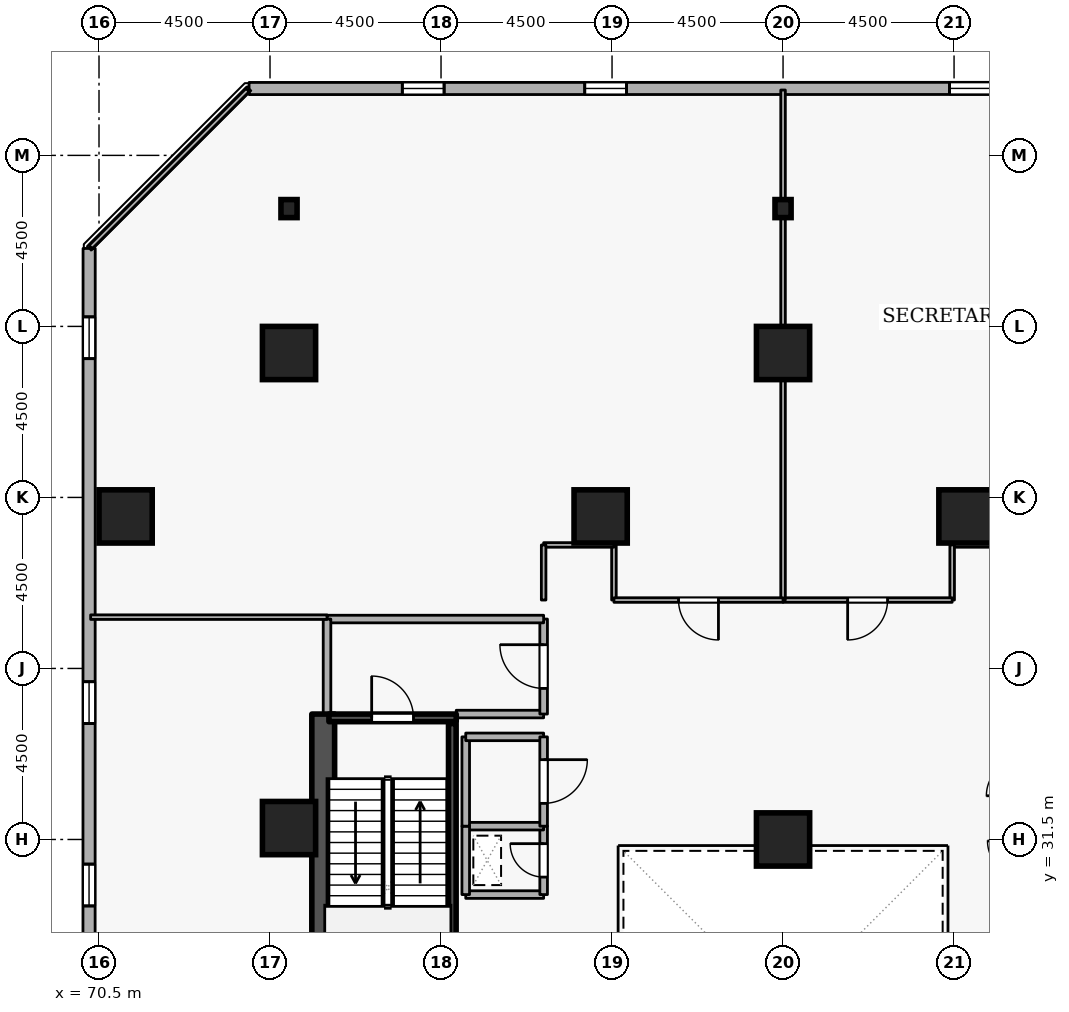
"""IFC4 building model, lengths in metres.
Left out: names, types, materials, properties, quantities, classifications, styles, units other than length and angle.
Written with IfcOpenShell. Run it as: python <this file> out.ifc"""

import sys

from ifc_helpers import new_model, si_unit, direction, frame, frame_2d, origin, origin_2d, place, context, subcontext, project, spatial, rectangle, i_section, extrude, element, fill, save


model = new_model("IFC4")
c1 = context("Model", 3, precision=1e-05, world=origin(), true_north=direction((0.0, 1.0)))
c2 = subcontext(c1, "Body", "Model", "MODEL_VIEW")
j1 = project(units=[si_unit("LENGTHUNIT", "METRE"), si_unit("PLANEANGLEUNIT", "RADIAN")], contexts=[c1])
p1 = place(None, origin())
s1 = spatial("IfcSite", under=j1, at=p1, CompositionType="ELEMENT")
p2 = place(p1, origin())
s2 = spatial("IfcBuilding", under=s1, at=p2, CompositionType="ELEMENT")
p3 = place(p2, frame((0.0, 0.0, 49.5)))
s3 = spatial("IfcBuildingStorey", under=s2, at=p3, CompositionType="ELEMENT", Elevation=49.5)
p4 = place(p3, frame((76.4, 19.2, 0.0), z_axis=(0.0, 0.0, 1.0), x_axis=(0.0, 1.0, 0.0)))
e1 = element("IfcWall", 1, at=p4, inside=s3, PredefinedType="SHEAR", context=c2, shape_type="SweptSolid", body=[
    extrude(rectangle(XDim=15.6, YDim=0.6, at=frame_2d((7.8, 0.0))), origin(), (0.0, 0.0, 1.0), 4.2),
])
for number, where, z_axis, x_axis in (
    (2, (88.5, 44.3, 0.0), (0.0, 0.0, 1.0), (1.0, 0.0, 0.0)),
    (3, (75.5, 44.3, 0.0), (0.0, 0.0, 1.0), (1.0, 0.0, 0.0)),
    (4, (71.2, 40.0, 0.0), (0.0, 0.0, 1.0), (1.0, 0.0, 0.0)),
    (5, (93.3, 40.0, 0.0), (0.0, 0.0, 1.0), (1.0, 0.0, 0.0)),
    (6, (83.7, 40.0, 0.0), (0.0, 0.0, 1.0), (1.0, 0.0, 0.0)),
    (7, (75.5, 31.8, 0.0), (0.0, 0.0, 1.0), (1.0, 0.0, 0.0)),
    (8, (88.5, 31.5, 0.0), (0.0, 0.0, 1.0), (1.0, 0.0, 0.0)),
):
    element("IfcColumn", number, at=place(p3, frame(where, z_axis=z_axis, x_axis=x_axis)), inside=s3, PredefinedType="COLUMN", context=c2, shape_type="SweptSolid", body=[
        extrude(rectangle(XDim=1.4, YDim=1.4, at=origin_2d()), origin(), (0.0, 0.0, 1.0), 4.2),
    ])
for number, where, z_axis, x_axis in (
    (9, (88.5, 48.1, 0.0), (0.0, 0.0, 1.0), (1.0, 0.0, 0.0)),
    (10, (75.5, 48.1, 0.0), (0.0, 0.0, 1.0), (1.0, 0.0, 0.0)),
):
    element("IfcColumn", number, at=place(p3, frame(where, z_axis=z_axis, x_axis=x_axis)), inside=s3, PredefinedType="COLUMN", context=c2, shape_type="SweptSolid", body=[
        extrude(i_section(OverallWidth=0.424, OverallDepth=0.475, WebThickness=0.048, FlangeThickness=0.077, FilletRadius=0.015, at=origin_2d()), origin(), (0.0, 0.0, 1.0), 4.2),
    ])
p5 = place(p3, frame((110.181, 51.265, 0.0), z_axis=(0.0, 0.0, 1.0), x_axis=(-0.999999988703, -0.000150313265, 0.0)))
e11 = element("IfcWall", 11, at=p5, inside=s3, PredefinedType="STANDARD", context=c2, shape_type="SweptSolid", body=[
    extrude(rectangle(XDim=35.733, YDim=0.32, at=frame_2d((17.866, 0.0))), origin(), (0.0, 0.0, 1.0), 3.3),
])
p6 = place(p5, frame((1.8, 0.0, 0.72)))
e12 = element("IfcOpeningElement", 12, at=p6, cuts=e11, PredefinedType="OPENING", context=c2, shape_type="SweptSolid", body=[
    extrude(rectangle(XDim=1.1, YDim=1.8, at=frame_2d((0.55, 0.9))), frame((0.0, 0.17, 0.0), z_axis=(0.0, -1.0, 0.0), x_axis=(1.0, 0.0, 0.0)), (0.0, 0.0, 1.0), 0.34),
])
p7 = place(p5, frame((11.4, 0.0, 0.72)))
e13 = element("IfcOpeningElement", 13, at=p7, cuts=e11, PredefinedType="OPENING", context=c2, shape_type="SweptSolid", body=[
    extrude(rectangle(XDim=1.1, YDim=1.8, at=frame_2d((0.55, 0.9))), frame((0.0, 0.17, 0.0), z_axis=(0.0, -1.0, 0.0), x_axis=(1.0, 0.0, 0.0)), (0.0, 0.0, 1.0), 0.34),
])
p8 = place(p5, frame((16.2, 0.0, 0.72)))
e14 = element("IfcOpeningElement", 14, at=p8, cuts=e11, PredefinedType="OPENING", context=c2, shape_type="SweptSolid", body=[
    extrude(rectangle(XDim=1.1, YDim=1.8, at=frame_2d((0.55, 0.9))), frame((0.0, 0.17, 0.0), z_axis=(0.0, -1.0, 0.0), x_axis=(1.0, 0.0, 0.0)), (0.0, 0.0, 1.0), 0.34),
])
p9 = place(p5, frame((25.8, 0.0, 0.72)))
e15 = element("IfcOpeningElement", 15, at=p9, cuts=e11, PredefinedType="OPENING", context=c2, shape_type="SweptSolid", body=[
    extrude(rectangle(XDim=1.1, YDim=1.8, at=frame_2d((0.55, 0.9))), frame((0.0, 0.17, 0.0), z_axis=(0.0, -1.0, 0.0), x_axis=(1.0, 0.0, 0.0)), (0.0, 0.0, 1.0), 0.34),
])
p10 = place(p5, frame((30.6, 0.0, 0.72)))
e16 = element("IfcOpeningElement", 16, at=p10, cuts=e11, PredefinedType="OPENING", context=c2, shape_type="SweptSolid", body=[
    extrude(rectangle(XDim=1.1, YDim=1.8, at=frame_2d((0.55, 0.9))), frame((0.0, 0.17, 0.0), z_axis=(0.0, -1.0, 0.0), x_axis=(1.0, 0.0, 0.0)), (0.0, 0.0, 1.0), 0.34),
])
p11 = place(p3, frame((70.24, 47.052, 0.0), z_axis=(0.0, 0.0, 1.0), x_axis=(-0.000150313265, -0.999999988703, 0.0)))
e17 = element("IfcWall", 17, at=p11, inside=s3, PredefinedType="STANDARD", context=c2, shape_type="SweptSolid", body=[
    extrude(rectangle(XDim=35.733, YDim=0.32, at=frame_2d((17.866, 0.0))), origin(), (0.0, 0.0, 1.0), 3.3),
])
p12 = place(p11, frame((1.8, 0.0, 0.72)))
e18 = element("IfcOpeningElement", 18, at=p12, cuts=e17, PredefinedType="OPENING", context=c2, shape_type="SweptSolid", body=[
    extrude(rectangle(XDim=1.1, YDim=1.8, at=frame_2d((0.55, 0.9))), frame((0.0, 0.17, 0.0), z_axis=(0.0, -1.0, 0.0), x_axis=(1.0, 0.0, 0.0)), (0.0, 0.0, 1.0), 0.34),
])
p13 = place(p11, frame((11.4, 0.0, 0.72)))
e19 = element("IfcOpeningElement", 19, at=p13, cuts=e17, PredefinedType="OPENING", context=c2, shape_type="SweptSolid", body=[
    extrude(rectangle(XDim=1.1, YDim=1.8, at=frame_2d((0.55, 0.9))), frame((0.0, 0.17, 0.0), z_axis=(0.0, -1.0, 0.0), x_axis=(1.0, 0.0, 0.0)), (0.0, 0.0, 1.0), 0.34),
])
p14 = place(p11, frame((16.2, 0.0, 0.72)))
e20 = element("IfcOpeningElement", 20, at=p14, cuts=e17, PredefinedType="OPENING", context=c2, shape_type="SweptSolid", body=[
    extrude(rectangle(XDim=1.1, YDim=1.8, at=frame_2d((0.55, 0.9))), frame((0.0, 0.17, 0.0), z_axis=(0.0, -1.0, 0.0), x_axis=(1.0, 0.0, 0.0)), (0.0, 0.0, 1.0), 0.34),
])
p15 = place(p11, frame((25.8, 0.0, 0.72)))
e21 = element("IfcOpeningElement", 21, at=p15, cuts=e17, PredefinedType="OPENING", context=c2, shape_type="SweptSolid", body=[
    extrude(rectangle(XDim=1.1, YDim=1.8, at=frame_2d((0.55, 0.9))), frame((0.0, 0.17, 0.0), z_axis=(0.0, -1.0, 0.0), x_axis=(1.0, 0.0, 0.0)), (0.0, 0.0, 1.0), 0.34),
])
p16 = place(p11, frame((30.6, 0.0, 0.72)))
e22 = element("IfcOpeningElement", 22, at=p16, cuts=e17, PredefinedType="OPENING", context=c2, shape_type="SweptSolid", body=[
    extrude(rectangle(XDim=1.1, YDim=1.8, at=frame_2d((0.55, 0.9))), frame((0.0, 0.17, 0.0), z_axis=(0.0, -1.0, 0.0), x_axis=(1.0, 0.0, 0.0)), (0.0, 0.0, 1.0), 0.34),
])
p17 = place(p3, frame((76.55, 34.7, 0.0), z_axis=(0.0, 0.0, 1.0), x_axis=(1.0, 0.0, 0.0)))
e23 = element("IfcWall", 23, at=p17, inside=s3, PredefinedType="SHEAR", context=c2, shape_type="SweptSolid", body=[
    extrude(rectangle(XDim=3.35, YDim=0.2, at=frame_2d((1.675, 0.0))), origin(), (0.0, 0.0, 1.0), 4.2),
])
p18 = place(p17, frame((1.125, 0.0, 0.0)))
e24 = element("IfcOpeningElement", 24, at=p18, cuts=e23, PredefinedType="OPENING", context=c2, shape_type="SweptSolid", body=[
    extrude(rectangle(XDim=1.1, YDim=2.1, at=frame_2d((0.55, 1.05))), frame((0.0, 0.11, 0.0), z_axis=(0.0, -1.0, 0.0), x_axis=(1.0, 0.0, 0.0)), (0.0, 0.0, 1.0), 0.22),
])
p19 = place(p3, frame((79.797, 27.45, 0.0), z_axis=(0.0, 0.0, 1.0), x_axis=(0.0, 1.0, 0.0)))
e25 = element("IfcWall", 25, at=p19, inside=s3, PredefinedType="SHEAR", context=c2, shape_type="SweptSolid", body=[
    extrude(rectangle(XDim=7.1, YDim=0.2, at=frame_2d((3.55, 0.0))), origin(), (0.0, 0.0, 1.0), 4.2),
])
p20 = place(p3, frame((79.9, 34.8, 0.0), z_axis=(0.0, 0.0, 1.0), x_axis=(1.0, 0.0, 0.0)))
e26 = element("IfcWall", 26, at=p20, inside=s3, PredefinedType="STANDARD", context=c2, shape_type="SweptSolid", body=[
    extrude(rectangle(XDim=2.3, YDim=0.2, at=frame_2d((1.15, 0.0))), origin(), (0.0, 0.0, 1.0), 3.145),
])
p21 = place(p3, frame((82.2, 34.8, 0.0), z_axis=(0.0, 0.0, 1.0), x_axis=(0.0, 1.0, 0.0)))
e27 = element("IfcWall", 27, at=p21, inside=s3, PredefinedType="STANDARD", context=c2, shape_type="SweptSolid", body=[
    extrude(rectangle(XDim=2.5, YDim=0.2, at=frame_2d((1.25, 0.0))), origin(), (0.0, 0.0, 1.0), 3.94),
])
p22 = place(p21, frame((0.675, 0.0, 0.0)))
e28 = element("IfcOpeningElement", 28, at=p22, cuts=e27, PredefinedType="OPENING", context=c2, shape_type="SweptSolid", body=[
    extrude(rectangle(XDim=1.15, YDim=2.1, at=frame_2d((0.575, 1.05))), frame((0.0, 0.11, 0.0), z_axis=(0.0, -1.0, 0.0), x_axis=(1.0, 0.0, 0.0)), (0.0, 0.0, 1.0), 0.22),
])
p23 = place(p3, frame((82.2, 37.3, 0.0), z_axis=(0.0, 0.0, 1.0), x_axis=(-1.0, 0.0, 0.0)))
e29 = element("IfcWall", 29, at=p23, inside=s3, PredefinedType="STANDARD", context=c2, shape_type="SweptSolid", body=[
    extrude(rectangle(XDim=5.7, YDim=0.2, at=frame_2d((2.85, 0.0))), origin(), (0.0, 0.0, 1.0), 3.94),
])
p24 = place(p3, frame((76.5, 37.3, 0.0), z_axis=(0.0, 0.0, 1.0), x_axis=(0.0, -1.0, 0.0)))
e30 = element("IfcWall", 30, at=p24, inside=s3, PredefinedType="STANDARD", context=c2, shape_type="SweptSolid", body=[
    extrude(rectangle(XDim=2.5, YDim=0.2, at=frame_2d((1.25, 0.0))), origin(), (0.0, 0.0, 1.0), 3.94),
])
p25 = place(p3, frame((80.15, 30.05, 0.0), z_axis=(0.0, 0.0, 1.0), x_axis=(1.0, 0.0, 0.0)))
e31 = element("IfcWall", 31, at=p25, inside=s3, PredefinedType="STANDARD", context=c2, shape_type="SweptSolid", body=[
    extrude(rectangle(XDim=2.05, YDim=0.2, at=frame_2d((1.025, 0.0))), origin(), (0.0, 0.0, 1.0), 3.94),
])
p26 = place(p3, frame((82.2, 30.05, 0.0), z_axis=(0.0, 0.0, 1.0), x_axis=(0.0, 1.0, 0.0)))
e32 = element("IfcWall", 32, at=p26, inside=s3, PredefinedType="STANDARD", context=c2, shape_type="SweptSolid", body=[
    extrude(rectangle(XDim=1.8, YDim=0.2, at=frame_2d((0.9, 0.0))), origin(), (0.0, 0.0, 1.0), 3.94),
])
p27 = place(p26, frame((0.46, 0.0, 0.0)))
e33 = element("IfcOpeningElement", 33, at=p27, cuts=e32, PredefinedType="OPENING", context=c2, shape_type="SweptSolid", body=[
    extrude(rectangle(XDim=0.88, YDim=2.04, at=frame_2d((0.44, 1.02))), frame((0.0, 0.11, 0.0), z_axis=(0.0, -1.0, 0.0), x_axis=(1.0, 0.0, 0.0)), (0.0, 0.0, 1.0), 0.22),
])
p28 = place(p3, frame((82.2, 31.85, 0.0), z_axis=(0.0, 0.0, 1.0), x_axis=(-1.0, 0.0, 0.0)))
e34 = element("IfcWall", 34, at=p28, inside=s3, PredefinedType="STANDARD", context=c2, shape_type="SweptSolid", body=[
    extrude(rectangle(XDim=2.05, YDim=0.2, at=frame_2d((1.025, 0.0))), origin(), (0.0, 0.0, 1.0), 3.94),
])
p29 = place(p3, frame((80.15, 31.85, 0.0), z_axis=(0.0, 0.0, 1.0), x_axis=(0.0, -1.0, 0.0)))
e35 = element("IfcWall", 35, at=p29, inside=s3, PredefinedType="STANDARD", context=c2, shape_type="SweptSolid", body=[
    extrude(rectangle(XDim=1.8, YDim=0.2, at=frame_2d((0.9, 0.0))), origin(), (0.0, 0.0, 1.0), 3.94),
])
p30 = place(p3, frame((80.15, 31.85, 0.0), z_axis=(0.0, 0.0, 1.0), x_axis=(0.0, 1.0, 0.0)))
e36 = element("IfcWall", 36, at=p30, inside=s3, PredefinedType="STANDARD", context=c2, shape_type="SweptSolid", body=[
    extrude(rectangle(XDim=2.35, YDim=0.2, at=frame_2d((1.175, 0.0))), origin(), (0.0, 0.0, 1.0), 3.94),
])
p31 = place(p3, frame((80.15, 34.2, 0.0), z_axis=(0.0, 0.0, 1.0), x_axis=(1.0, 0.0, 0.0)))
e37 = element("IfcWall", 37, at=p31, inside=s3, PredefinedType="STANDARD", context=c2, shape_type="SweptSolid", body=[
    extrude(rectangle(XDim=2.05, YDim=0.2, at=frame_2d((1.025, 0.0))), origin(), (0.0, 0.0, 1.0), 3.145),
])
p32 = place(p3, frame((82.2, 34.2, 0.0), z_axis=(0.0, 0.0, 1.0), x_axis=(0.0, -1.0, 0.0)))
e38 = element("IfcWall", 38, at=p32, inside=s3, PredefinedType="STANDARD", context=c2, shape_type="SweptSolid", body=[
    extrude(rectangle(XDim=2.35, YDim=0.2, at=frame_2d((1.175, 0.0))), origin(), (0.0, 0.0, 1.0), 3.94),
])
p33 = place(p32, frame((0.6, 0.0, 0.0)))
e39 = element("IfcOpeningElement", 39, at=p33, cuts=e38, PredefinedType="OPENING", context=c2, shape_type="SweptSolid", body=[
    extrude(rectangle(XDim=1.15, YDim=2.1, at=frame_2d((0.575, 1.05))), frame((0.0, 0.11, 0.0), z_axis=(0.0, -1.0, 0.0), x_axis=(1.0, 0.0, 0.0)), (0.0, 0.0, 1.0), 0.22),
])
p34 = place(p3, frame((94.8, 39.25, 0.0), z_axis=(0.0, 0.0, 1.0), x_axis=(-1.0, 0.0, 0.0)))
e40 = element("IfcWall", 40, at=p34, inside=s3, PredefinedType="PARTITIONING", context=c2, shape_type="SweptSolid", body=[
    extrude(rectangle(XDim=1.85, YDim=0.12, at=frame_2d((0.925, 0.0))), origin(), (0.0, 0.0, 1.0), 3.94),
])
p35 = place(p3, frame((92.95, 39.25, 0.0), z_axis=(0.0, 0.0, 1.0), x_axis=(0.0, -1.0, 0.0)))
e41 = element("IfcWall", 41, at=p35, inside=s3, PredefinedType="PARTITIONING", context=c2, shape_type="SweptSolid", body=[
    extrude(rectangle(XDim=1.45, YDim=0.12, at=frame_2d((0.725, 0.0))), origin(), (0.0, 0.0, 1.0), 3.94),
])
p36 = place(p3, frame((92.95, 37.8, 0.0), z_axis=(0.0, 0.0, 1.0), x_axis=(-1.0, 0.0, 0.0)))
e42 = element("IfcWall", 42, at=p36, inside=s3, PredefinedType="PARTITIONING", context=c2, shape_type="SweptSolid", body=[
    extrude(rectangle(XDim=4.45, YDim=0.12, at=frame_2d((2.225, 0.0))), origin(), (0.0, 0.0, 1.0), 3.94),
])
p37 = place(p36, frame((1.7, 0.0, 0.0)))
e43 = element("IfcOpeningElement", 43, at=p37, cuts=e42, PredefinedType="OPENING", context=c2, shape_type="SweptSolid", body=[
    extrude(rectangle(XDim=1.05, YDim=2.1, at=frame_2d((0.525, 1.05))), frame((0.0, 0.07, 0.0), z_axis=(0.0, -1.0, 0.0), x_axis=(1.0, 0.0, 0.0)), (0.0, 0.0, 1.0), 0.14),
])
p38 = place(p3, frame((88.5, 37.8, 0.0), z_axis=(0.0, 0.0, 1.0), x_axis=(0.0, 1.0, 0.0)))
e44 = element("IfcWall", 44, at=p38, inside=s3, PredefinedType="PARTITIONING", context=c2, shape_type="SweptSolid", body=[
    extrude(rectangle(XDim=13.42, YDim=0.12, at=frame_2d((6.71, 0.0))), origin(), (0.0, 0.0, 1.0), 3.532),
])
p39 = place(p3, frame((84.05, 37.8, 0.0), z_axis=(0.0, 0.0, 1.0), x_axis=(0.0, 1.0, 0.0)))
e45 = element("IfcWall", 45, at=p39, inside=s3, PredefinedType="PARTITIONING", context=c2, shape_type="SweptSolid", body=[
    extrude(rectangle(XDim=1.45, YDim=0.12, at=frame_2d((0.725, 0.0))), origin(), (0.0, 0.0, 1.0), 3.94),
])
p40 = place(p3, frame((84.05, 39.25, 0.0), z_axis=(0.0, 0.0, 1.0), x_axis=(-1.0, 0.0, 0.0)))
e46 = element("IfcWall", 46, at=p40, inside=s3, PredefinedType="PARTITIONING", context=c2, shape_type="SweptSolid", body=[
    extrude(rectangle(XDim=1.85, YDim=0.12, at=frame_2d((0.925, 0.0))), origin(), (0.0, 0.0, 1.0), 3.94),
])
p41 = place(p3, frame((82.2, 39.25, 0.0), z_axis=(0.0, 0.0, 1.0), x_axis=(0.0, -1.0, 0.0)))
e47 = element("IfcWall", 47, at=p41, inside=s3, PredefinedType="PARTITIONING", context=c2, shape_type="SweptSolid", body=[
    extrude(rectangle(XDim=1.45, YDim=0.12, at=frame_2d((0.725, 0.0))), origin(), (0.0, 0.0, 1.0), 3.94),
])
p42 = place(p3, frame((76.5, 37.35, 0.0), z_axis=(0.0, 0.0, 1.0), x_axis=(-1.0, 0.0, 0.0)))
e48 = element("IfcWall", 48, at=p42, inside=s3, PredefinedType="PARTITIONING", context=c2, shape_type="SweptSolid", body=[
    extrude(rectangle(XDim=6.22, YDim=0.12, at=frame_2d((3.11, 0.0))), origin(), (0.0, 0.0, 1.0), 3.94),
])
p43 = place(p3, frame((70.28, 47.089, 0.0), z_axis=(0.0, 0.0, 1.0), x_axis=(0.707106781187, 0.707106781187, 0.0)))
e49 = element("IfcWall", 49, at=p43, inside=s3, PredefinedType="PARTITIONING", context=c2, shape_type="SweptSolid", body=[
    extrude(rectangle(XDim=5.842, YDim=0.12, at=frame_2d((2.921, 0.0))), origin(), (0.0, 0.0, 1.0), 3.94),
])
p44 = place(p3, frame((88.5, 37.8, 0.0), z_axis=(0.0, 0.0, 1.0), x_axis=(-1.0, 0.0, 0.0)))
e50 = element("IfcWall", 50, at=p44, inside=s3, PredefinedType="PARTITIONING", context=c2, shape_type="SweptSolid", body=[
    extrude(rectangle(XDim=4.45, YDim=0.12, at=frame_2d((2.225, 0.0))), origin(), (0.0, 0.0, 1.0), 3.94),
])
p45 = place(p44, frame((1.7, 0.0, 0.0)))
e51 = element("IfcOpeningElement", 51, at=p45, cuts=e50, PredefinedType="OPENING", context=c2, shape_type="SweptSolid", body=[
    extrude(rectangle(XDim=1.05, YDim=2.1, at=frame_2d((0.525, 1.05))), frame((0.0, 0.07, 0.0), z_axis=(0.0, -1.0, 0.0), x_axis=(1.0, 0.0, 0.0)), (0.0, 0.0, 1.0), 0.14),
])
p46 = place(p8, origin())
e52 = element("IfcWindow", 52, at=p46, inside=s3, PartitioningType="SINGLE_PANEL", PredefinedType="WINDOW", context=c2, shape_type="SweptSolid", body=[
    extrude(rectangle(XDim=1.1, YDim=1.8, at=frame_2d((0.55, 0.9))), frame((0.0, 0.03, 0.0), z_axis=(0.0, -1.0, 0.0), x_axis=(1.0, 0.0, 0.0)), (0.0, 0.0, 1.0), 0.06),
])
fill(e14, e52)
p47 = place(p9, origin())
e53 = element("IfcWindow", 53, at=p47, inside=s3, PartitioningType="SINGLE_PANEL", PredefinedType="WINDOW", context=c2, shape_type="SweptSolid", body=[
    extrude(rectangle(XDim=1.1, YDim=1.8, at=frame_2d((0.55, 0.9))), frame((0.0, 0.03, 0.0), z_axis=(0.0, -1.0, 0.0), x_axis=(1.0, 0.0, 0.0)), (0.0, 0.0, 1.0), 0.06),
])
fill(e15, e53)
p48 = place(p10, origin())
e54 = element("IfcWindow", 54, at=p48, inside=s3, PartitioningType="SINGLE_PANEL", PredefinedType="WINDOW", context=c2, shape_type="SweptSolid", body=[
    extrude(rectangle(XDim=1.1, YDim=1.8, at=frame_2d((0.55, 0.9))), frame((0.0, 0.03, 0.0), z_axis=(0.0, -1.0, 0.0), x_axis=(1.0, 0.0, 0.0)), (0.0, 0.0, 1.0), 0.06),
])
fill(e16, e54)
p49 = place(p12, origin())
e55 = element("IfcWindow", 55, at=p49, inside=s3, PartitioningType="SINGLE_PANEL", PredefinedType="WINDOW", context=c2, shape_type="SweptSolid", body=[
    extrude(rectangle(XDim=1.1, YDim=1.8, at=frame_2d((0.55, 0.9))), frame((0.0, 0.03, 0.0), z_axis=(0.0, -1.0, 0.0), x_axis=(1.0, 0.0, 0.0)), (0.0, 0.0, 1.0), 0.06),
])
fill(e18, e55)
p50 = place(p13, origin())
e56 = element("IfcWindow", 56, at=p50, inside=s3, PartitioningType="SINGLE_PANEL", PredefinedType="WINDOW", context=c2, shape_type="SweptSolid", body=[
    extrude(rectangle(XDim=1.1, YDim=1.8, at=frame_2d((0.55, 0.9))), frame((0.0, 0.03, 0.0), z_axis=(0.0, -1.0, 0.0), x_axis=(1.0, 0.0, 0.0)), (0.0, 0.0, 1.0), 0.06),
])
fill(e19, e56)
p51 = place(p14, origin())
e57 = element("IfcWindow", 57, at=p51, inside=s3, PartitioningType="SINGLE_PANEL", PredefinedType="WINDOW", context=c2, shape_type="SweptSolid", body=[
    extrude(rectangle(XDim=1.1, YDim=1.8, at=frame_2d((0.55, 0.9))), frame((0.0, 0.03, 0.0), z_axis=(0.0, -1.0, 0.0), x_axis=(1.0, 0.0, 0.0)), (0.0, 0.0, 1.0), 0.06),
])
fill(e20, e57)
p52 = place(p18, origin())
e58 = element("IfcDoor", 58, at=p52, inside=s3, OperationType="SINGLE_SWING_LEFT", PredefinedType="DOOR", context=c2, shape_type="SweptSolid", body=[
    extrude(rectangle(XDim=1.1, YDim=2.1, at=frame_2d((0.55, 1.05))), frame((0.0, 0.025, 0.0), z_axis=(0.0, -1.0, 0.0), x_axis=(1.0, 0.0, 0.0)), (0.0, 0.0, 1.0), 0.05),
])
fill(e24, e58)
p53 = place(p22, origin())
e59 = element("IfcDoor", 59, at=p53, inside=s3, OperationType="SINGLE_SWING_RIGHT", PredefinedType="DOOR", context=c2, shape_type="SweptSolid", body=[
    extrude(rectangle(XDim=1.15, YDim=2.1, at=frame_2d((0.575, 1.05))), frame((0.0, 0.025, 0.0), z_axis=(0.0, -1.0, 0.0), x_axis=(1.0, 0.0, 0.0)), (0.0, 0.0, 1.0), 0.05),
])
fill(e28, e59)
p54 = place(p27, origin())
e60 = element("IfcDoor", 60, at=p54, inside=s3, OperationType="SINGLE_SWING_RIGHT", PredefinedType="DOOR", context=c2, shape_type="SweptSolid", body=[
    extrude(rectangle(XDim=0.88, YDim=2.04, at=frame_2d((0.44, 1.02))), frame((0.0, 0.025, 0.0), z_axis=(0.0, -1.0, 0.0), x_axis=(1.0, 0.0, 0.0)), (0.0, 0.0, 1.0), 0.05),
])
fill(e33, e60)
p55 = place(p33, origin())
e61 = element("IfcDoor", 61, at=p55, inside=s3, OperationType="SINGLE_SWING_LEFT", PredefinedType="DOOR", context=c2, shape_type="SweptSolid", body=[
    extrude(rectangle(XDim=1.15, YDim=2.1, at=frame_2d((0.575, 1.05))), frame((0.0, 0.025, 0.0), z_axis=(0.0, -1.0, 0.0), x_axis=(1.0, 0.0, 0.0)), (0.0, 0.0, 1.0), 0.05),
])
fill(e39, e61)
p56 = place(p37, origin())
e62 = element("IfcDoor", 62, at=p56, inside=s3, OperationType="SINGLE_SWING_RIGHT", PredefinedType="DOOR", context=c2, shape_type="SweptSolid", body=[
    extrude(rectangle(XDim=1.05, YDim=2.1, at=frame_2d((0.525, 1.05))), frame((0.0, 0.025, 0.0), z_axis=(0.0, -1.0, 0.0), x_axis=(1.0, 0.0, 0.0)), (0.0, 0.0, 1.0), 0.05),
])
fill(e43, e62)
p57 = place(p45, origin())
e63 = element("IfcDoor", 63, at=p57, inside=s3, OperationType="SINGLE_SWING_LEFT", PredefinedType="DOOR", context=c2, shape_type="SweptSolid", body=[
    extrude(rectangle(XDim=1.05, YDim=2.1, at=frame_2d((0.525, 1.05))), frame((0.0, 0.025, 0.0), z_axis=(0.0, -1.0, 0.0), x_axis=(1.0, 0.0, 0.0)), (0.0, 0.0, 1.0), 0.05),
])
fill(e51, e63)
save(model, sys.argv[1])
